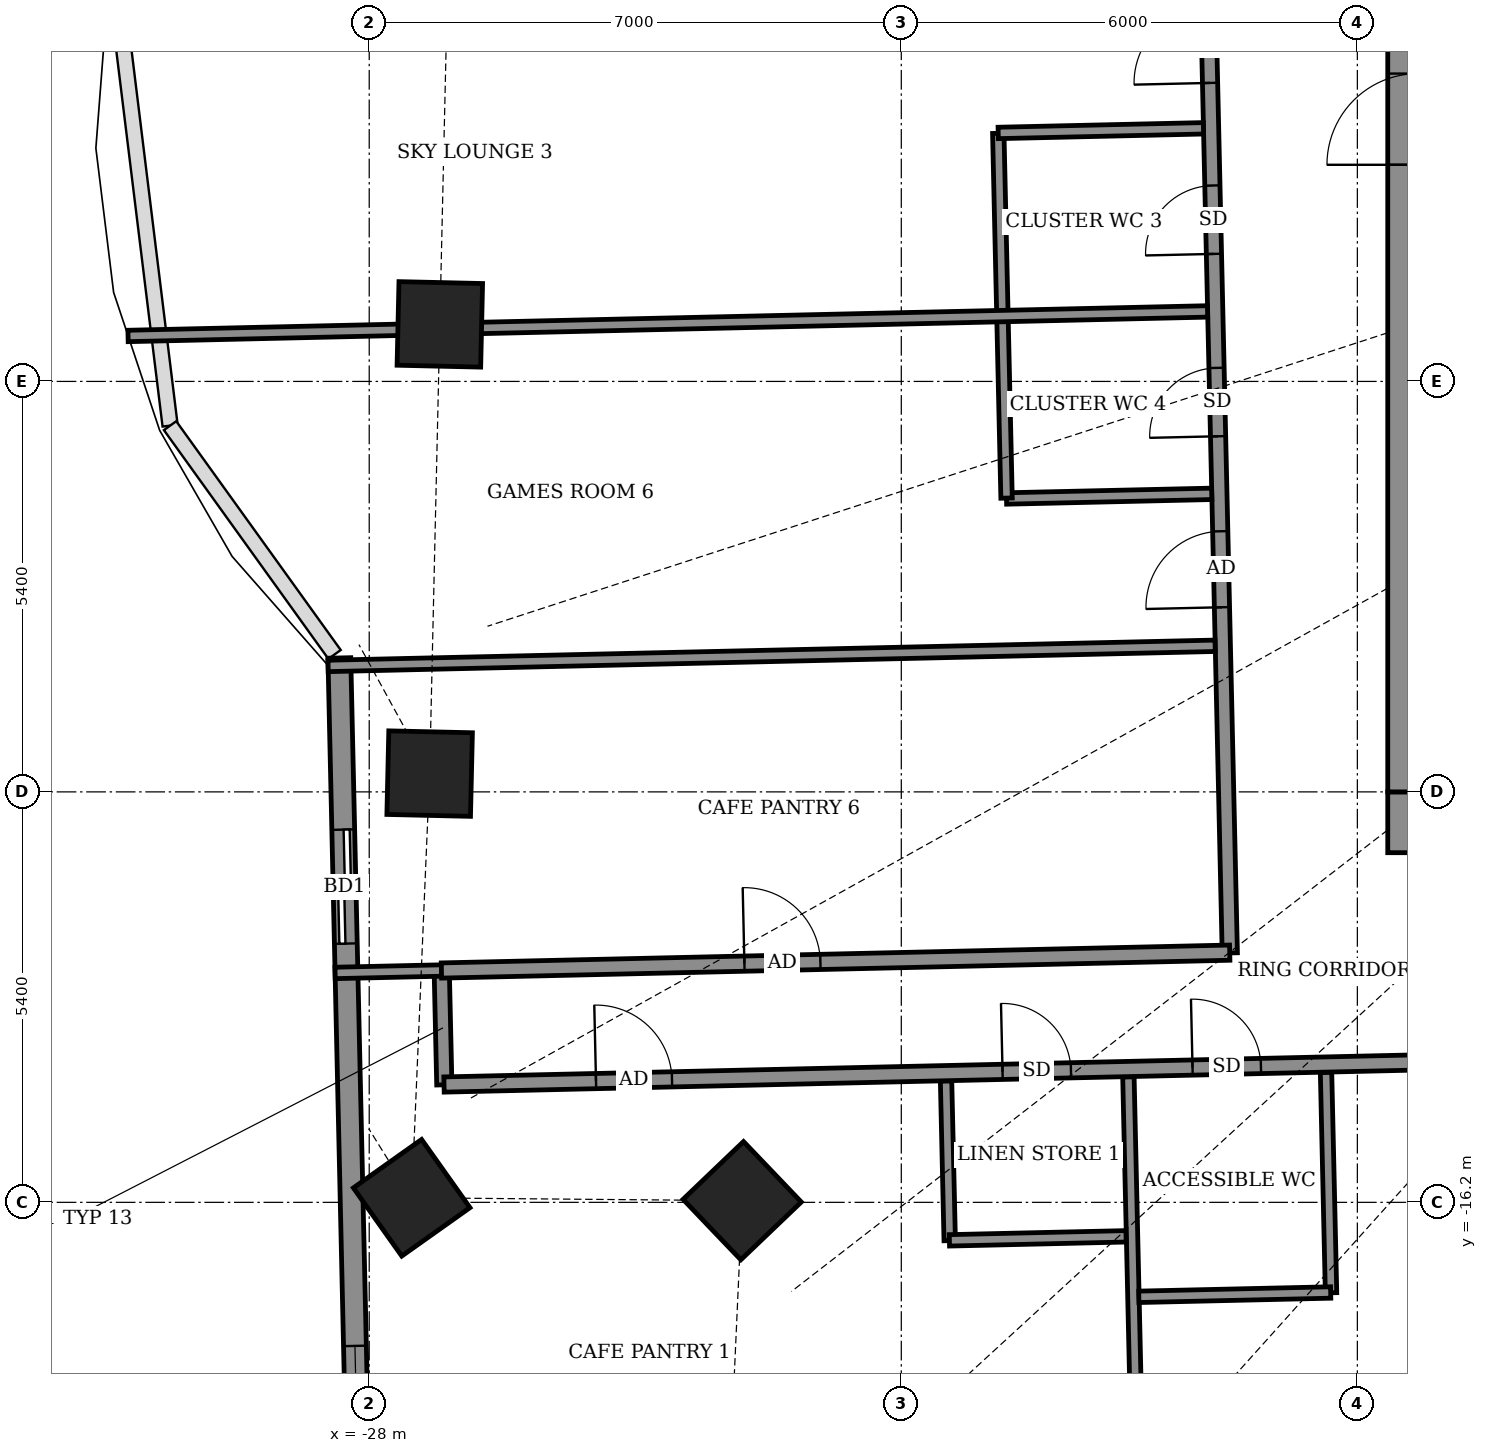
"""IFC4 building model, lengths in metres.
Left out: names, types, materials, properties, quantities, classifications, styles, units other than length and angle.
Written with IfcOpenShell. Run it as: python <this file> out.ifc"""

import sys

from ifc_helpers import new_model, si_unit, direction, frame, frame_2d, origin, origin_2d, place, context, subcontext, project, spatial, rectangle, extrude, element, fill, save


model = new_model("IFC4")
c1 = context("Model", 3, precision=1e-05, world=origin(), true_north=direction((0.0, 1.0)))
c2 = subcontext(c1, "Body", "Model", "MODEL_VIEW")
j1 = project(units=[si_unit("LENGTHUNIT", "METRE"), si_unit("PLANEANGLEUNIT", "RADIAN")], contexts=[c1])
p1 = place(None, origin())
s1 = spatial("IfcSite", under=j1, at=p1, CompositionType="ELEMENT")
p2 = place(p1, origin())
s2 = spatial("IfcBuilding", under=s1, at=p2, CompositionType="ELEMENT")
p3 = place(p2, frame((0.0, 0.0, 226.5)))
s3 = spatial("IfcBuildingStorey", under=s2, at=p3, CompositionType="ELEMENT", Elevation=226.5)
for number, where, z_axis, x_axis in (
    (1, (-27.071, -4.649, -0.55), (0.0, 0.0, 1.0), (-0.023, -1.0, 0.0)),
    (2, (-27.205, -10.56, -0.55), (0.0, 0.0, 1.0), (-0.023, -1.0, 0.0)),
    (3, (-27.441, -16.14, -0.55), (0.0, 0.0, 1.0), (0.579, -0.816, 0.0)),
    (4, (-23.093, -16.178, -0.55), (0.0, 0.0, 1.0), (0.691, -0.723, 0.0)),
):
    element("IfcColumn", number, at=place(p3, frame(where, z_axis=z_axis, x_axis=x_axis)), inside=s3, PredefinedType="COLUMN", context=c2, shape_type="SweptSolid", body=[
        extrude(rectangle(XDim=1.1, YDim=1.1, at=origin_2d()), origin(), (0.0, 0.0, 1.0), 4.6),
    ])
p4 = place(p3, frame((-28.393, -9.038, 0.0), z_axis=(0.0, 0.0, 1.0), x_axis=(0.022656635459, -0.999743305489, 0.0)))
e5 = element("IfcWall", 5, at=p4, inside=s3, PredefinedType="SOLIDWALL", context=c2, shape_type="SweptSolid", body=[
    extrude(rectangle(XDim=12.672, YDim=0.3, at=frame_2d((6.336, 0.0))), origin(), (0.0, 0.0, 1.0), 2.85),
])
p5 = place(p4, frame((2.259, 0.0, 0.0)))
e6 = element("IfcOpeningElement", 6, at=p5, cuts=e5, PredefinedType="OPENING", context=c2, shape_type="SweptSolid", body=[
    extrude(rectangle(XDim=1.5, YDim=2.4, at=frame_2d((0.75, 1.2))), frame((0.0, 0.16, 0.0), z_axis=(0.0, -1.0, 0.0), x_axis=(1.0, 0.0, 0.0)), (0.0, 0.0, 1.0), 0.32),
])
p6 = place(p4, frame((9.053, 0.0, 0.9)))
e7 = element("IfcOpeningElement", 7, at=p6, cuts=e5, PredefinedType="OPENING", context=c2, shape_type="SweptSolid", body=[
    extrude(rectangle(XDim=2.4, YDim=1.5, at=frame_2d((1.2, 0.75))), frame((0.0, 0.16, 0.0), z_axis=(0.0, -1.0, 0.0), x_axis=(1.0, 0.0, 0.0)), (0.0, 0.0, 1.0), 0.32),
])
p7 = place(p3, frame((-17.753, -25.923, 0.0), z_axis=(0.0, 0.0, 1.0), x_axis=(-0.022770155219, 0.999740726404, 0.0)))
e8 = element("IfcWall", 8, at=p7, inside=s3, PredefinedType="PARTITIONING", context=c2, shape_type="SweptSolid", body=[
    extrude(rectangle(XDim=11.376, YDim=0.15, at=frame_2d((5.688, 0.0))), origin(), (0.0, 0.0, 1.0), 2.55),
])
p8 = place(p3, frame((-15.346, -17.39, 0.0), z_axis=(0.0, 0.0, 1.0), x_axis=(-0.022817032779, 0.999739657619, 0.0)))
e9 = element("IfcWall", 9, at=p8, inside=s3, PredefinedType="PARTITIONING", context=c2, shape_type="SweptSolid", body=[
    extrude(rectangle(XDim=2.9, YDim=0.15, at=frame_2d((1.45, 0.0))), origin(), (0.0, 0.0, 1.0), 2.75),
])
p9 = place(p3, frame((-17.875, -17.443, 0.0), z_axis=(0.0, 0.0, 1.0), x_axis=(0.99974392816, 0.022629142889, 0.0)))
e10 = element("IfcWall", 10, at=p9, inside=s3, PredefinedType="PARTITIONING", context=c2, shape_type="SweptSolid", body=[
    extrude(rectangle(XDim=2.525, YDim=0.15, at=frame_2d((1.262, 0.0))), origin(), (0.0, 0.0, 1.0), 2.85),
])
p10 = place(p3, frame((-20.363, -16.704, 0.0), z_axis=(0.0, 0.0, 1.0), x_axis=(-0.022779486249, 0.999740513837, 0.0)))
e11 = element("IfcWall", 11, at=p10, inside=s3, PredefinedType="PARTITIONING", context=c2, shape_type="SweptSolid", body=[
    extrude(rectangle(XDim=2.101, YDim=0.15, at=frame_2d((1.05, 0.0))), origin(), (0.0, 0.0, 1.0), 2.85),
])
p11 = place(p3, frame((-20.367, -16.7, 0.0), z_axis=(0.0, 0.0, 1.0), x_axis=(0.999740260747, 0.02279059109, 0.0)))
e12 = element("IfcWall", 12, at=p11, inside=s3, PredefinedType="PARTITIONING", context=c2, shape_type="SweptSolid", body=[
    extrude(rectangle(XDim=2.324, YDim=0.15, at=frame_2d((1.162, 0.0))), origin(), (0.0, 0.0, 1.0), 2.75),
])
p12 = place(p3, frame((-27.012, -14.654, 0.0), z_axis=(0.0, 0.0, 1.0), x_axis=(-0.022617910375, 0.999744182344, 0.0)))
e13 = element("IfcWall", 13, at=p12, inside=s3, PredefinedType="PARTITIONING", context=c2, shape_type="SweptSolid", body=[
    extrude(rectangle(XDim=1.5, YDim=0.2, at=frame_2d((0.75, 0.0))), origin(), (0.0, 0.0, 1.0), 2.55),
])
p13 = place(p3, frame((-27.016, -14.65, 0.0), z_axis=(0.0, 0.0, 1.0), x_axis=(0.999742722722, 0.022682335961, 0.0)))
e14 = element("IfcWall", 14, at=p13, inside=s3, PredefinedType="PARTITIONING", context=c2, shape_type="SweptSolid", body=[
    extrude(rectangle(XDim=49.114, YDim=0.2, at=frame_2d((24.557, 0.0))), origin(), (0.0, 0.0, 1.0), 2.55),
])
p14 = place(p13, frame((2.0, 0.0, 0.0)))
e15 = element("IfcOpeningElement", 15, at=p14, cuts=e14, PredefinedType="OPENING", context=c2, shape_type="SweptSolid", body=[
    extrude(rectangle(XDim=1.0, YDim=2.1, at=frame_2d((0.5, 1.05))), frame((0.0, 0.11, 0.0), z_axis=(0.0, -1.0, 0.0), x_axis=(1.0, 0.0, 0.0)), (0.0, 0.0, 1.0), 0.22),
])
p15 = place(p13, frame((7.35, 0.0, 0.0)))
e16 = element("IfcOpeningElement", 16, at=p15, cuts=e14, PredefinedType="OPENING", context=c2, shape_type="SweptSolid", body=[
    extrude(rectangle(XDim=0.9, YDim=2.1, at=frame_2d((0.45, 1.05))), frame((0.0, 0.11, 0.0), z_axis=(0.0, -1.0, 0.0), x_axis=(1.0, 0.0, 0.0)), (0.0, 0.0, 1.0), 0.22),
])
p16 = place(p13, frame((13.725, 0.0, 0.0)))
e17 = element("IfcOpeningElement", 17, at=p16, cuts=e14, PredefinedType="OPENING", context=c2, shape_type="SweptSolid", body=[
    extrude(rectangle(XDim=1.0, YDim=2.1, at=frame_2d((0.5, 1.05))), frame((0.0, 0.11, 0.0), z_axis=(0.0, -1.0, 0.0), x_axis=(1.0, 0.0, 0.0)), (0.0, 0.0, 1.0), 0.22),
])
p17 = place(p13, frame((9.85, 0.0, 0.0)))
e18 = element("IfcOpeningElement", 18, at=p17, cuts=e14, PredefinedType="OPENING", context=c2, shape_type="SweptSolid", body=[
    extrude(rectangle(XDim=0.9, YDim=2.1, at=frame_2d((0.45, 1.05))), frame((0.0, 0.11, 0.0), z_axis=(0.0, -1.0, 0.0), x_axis=(1.0, 0.0, 0.0)), (0.0, 0.0, 1.0), 0.22),
])
p18 = place(p13, frame((17.65, 0.0, 0.0)))
e19 = element("IfcOpeningElement", 19, at=p18, cuts=e14, PredefinedType="OPENING", context=c2, shape_type="SweptSolid", body=[
    extrude(rectangle(XDim=0.9, YDim=2.1, at=frame_2d((0.45, 1.05))), frame((0.0, 0.11, 0.0), z_axis=(0.0, -1.0, 0.0), x_axis=(1.0, 0.0, 0.0)), (0.0, 0.0, 1.0), 0.22),
])
p19 = place(p13, frame((24.95, 0.0, 0.0)))
e20 = element("IfcOpeningElement", 20, at=p19, cuts=e14, PredefinedType="OPENING", context=c2, shape_type="SweptSolid", body=[
    extrude(rectangle(XDim=0.9, YDim=2.1, at=frame_2d((0.45, 1.05))), frame((0.0, 0.11, 0.0), z_axis=(0.0, -1.0, 0.0), x_axis=(1.0, 0.0, 0.0)), (0.0, 0.0, 1.0), 0.22),
])
p20 = place(p13, frame((27.425, 0.0, 0.0)))
e21 = element("IfcOpeningElement", 21, at=p20, cuts=e14, PredefinedType="OPENING", context=c2, shape_type="SweptSolid", body=[
    extrude(rectangle(XDim=0.9, YDim=2.1, at=frame_2d((0.45, 1.05))), frame((0.0, 0.11, 0.0), z_axis=(0.0, -1.0, 0.0), x_axis=(1.0, 0.0, 0.0)), (0.0, 0.0, 1.0), 0.22),
])
p21 = place(p13, frame((35.75, 0.0, 0.0)))
e22 = element("IfcOpeningElement", 22, at=p21, cuts=e14, PredefinedType="OPENING", context=c2, shape_type="SweptSolid", body=[
    extrude(rectangle(XDim=1.0, YDim=2.1, at=frame_2d((0.5, 1.05))), frame((0.0, 0.11, 0.0), z_axis=(0.0, -1.0, 0.0), x_axis=(1.0, 0.0, 0.0)), (0.0, 0.0, 1.0), 0.22),
])
p22 = place(p13, frame((32.25, 0.0, 0.0)))
e23 = element("IfcOpeningElement", 23, at=p22, cuts=e14, PredefinedType="OPENING", context=c2, shape_type="SweptSolid", body=[
    extrude(rectangle(XDim=0.9, YDim=2.1, at=frame_2d((0.45, 1.05))), frame((0.0, 0.11, 0.0), z_axis=(0.0, -1.0, 0.0), x_axis=(1.0, 0.0, 0.0)), (0.0, 0.0, 1.0), 0.22),
])
p23 = place(p13, frame((40.925, 0.0, 0.0)))
e24 = element("IfcOpeningElement", 24, at=p23, cuts=e14, PredefinedType="OPENING", context=c2, shape_type="SweptSolid", body=[
    extrude(rectangle(XDim=1.0, YDim=2.1, at=frame_2d((0.5, 1.05))), frame((0.0, 0.11, 0.0), z_axis=(0.0, -1.0, 0.0), x_axis=(1.0, 0.0, 0.0)), (0.0, 0.0, 1.0), 0.22),
])
p24 = place(p13, frame((47.607, 0.0, 0.0)))
e25 = element("IfcOpeningElement", 25, at=p24, cuts=e14, PredefinedType="OPENING", context=c2, shape_type="SweptSolid", body=[
    extrude(rectangle(XDim=1.0, YDim=2.1, at=frame_2d((0.5, 1.05))), frame((0.0, 0.11, 0.0), z_axis=(0.0, -1.0, 0.0), x_axis=(1.0, 0.0, 0.0)), (0.0, 0.0, 1.0), 0.22),
])
p25 = place(p3, frame((-16.678, -12.919, 0.0), z_axis=(0.0, 0.0, 1.0), x_axis=(-0.022696191528, 0.999742408268, 0.0)))
e26 = element("IfcWall", 26, at=p25, inside=s3, PredefinedType="PARTITIONING", context=c2, shape_type="SweptSolid", body=[
    extrude(rectangle(XDim=25.074, YDim=0.2, at=frame_2d((12.537, 0.0))), origin(), (0.0, 0.0, 1.0), 2.65),
])
p26 = place(p25, frame((19.737, 0.0, 0.0)))
e27 = element("IfcOpeningElement", 27, at=p26, cuts=e26, PredefinedType="OPENING", context=c2, shape_type="SweptSolid", body=[
    extrude(rectangle(XDim=1.0, YDim=2.1, at=frame_2d((0.5, 1.05))), frame((0.0, 0.11, 0.0), z_axis=(0.0, -1.0, 0.0), x_axis=(1.0, 0.0, 0.0)), (0.0, 0.0, 1.0), 0.22),
])
p27 = place(p25, frame((23.424, 0.0, 0.0)))
e28 = element("IfcOpeningElement", 28, at=p27, cuts=e26, PredefinedType="OPENING", context=c2, shape_type="SweptSolid", body=[
    extrude(rectangle(XDim=0.9, YDim=2.1, at=frame_2d((0.45, 1.05))), frame((0.0, 0.11, 0.0), z_axis=(0.0, -1.0, 0.0), x_axis=(1.0, 0.0, 0.0)), (0.0, 0.0, 1.0), 0.22),
])
p28 = place(p25, frame((13.624, 0.0, 0.0)))
e29 = element("IfcOpeningElement", 29, at=p28, cuts=e26, PredefinedType="OPENING", context=c2, shape_type="SweptSolid", body=[
    extrude(rectangle(XDim=1.0, YDim=2.1, at=frame_2d((0.5, 1.05))), frame((0.0, 0.11, 0.0), z_axis=(0.0, -1.0, 0.0), x_axis=(1.0, 0.0, 0.0)), (0.0, 0.0, 1.0), 0.22),
])
p29 = place(p25, frame((16.049, 0.0, 0.0)))
e30 = element("IfcOpeningElement", 30, at=p29, cuts=e26, PredefinedType="OPENING", context=c2, shape_type="SweptSolid", body=[
    extrude(rectangle(XDim=0.9, YDim=2.1, at=frame_2d((0.45, 1.05))), frame((0.0, 0.11, 0.0), z_axis=(0.0, -1.0, 0.0), x_axis=(1.0, 0.0, 0.0)), (0.0, 0.0, 1.0), 0.22),
])
p30 = place(p25, frame((11.449, 0.0, 0.0)))
e31 = element("IfcOpeningElement", 31, at=p30, cuts=e26, PredefinedType="OPENING", context=c2, shape_type="SweptSolid", body=[
    extrude(rectangle(XDim=1.0, YDim=2.1, at=frame_2d((0.5, 1.05))), frame((0.0, 0.11, 0.0), z_axis=(0.0, -1.0, 0.0), x_axis=(1.0, 0.0, 0.0)), (0.0, 0.0, 1.0), 0.22),
])
p31 = place(p25, frame((9.199, 0.0, 0.0)))
e32 = element("IfcOpeningElement", 32, at=p31, cuts=e26, PredefinedType="OPENING", context=c2, shape_type="SweptSolid", body=[
    extrude(rectangle(XDim=0.9, YDim=2.1, at=frame_2d((0.45, 1.05))), frame((0.0, 0.11, 0.0), z_axis=(0.0, -1.0, 0.0), x_axis=(1.0, 0.0, 0.0)), (0.0, 0.0, 1.0), 0.22),
])
p32 = place(p25, frame((4.549, 0.0, 0.0)))
e33 = element("IfcOpeningElement", 33, at=p32, cuts=e26, PredefinedType="OPENING", context=c2, shape_type="SweptSolid", body=[
    extrude(rectangle(XDim=1.0, YDim=2.1, at=frame_2d((0.5, 1.05))), frame((0.0, 0.11, 0.0), z_axis=(0.0, -1.0, 0.0), x_axis=(1.0, 0.0, 0.0)), (0.0, 0.0, 1.0), 0.22),
])
p33 = place(p25, frame((6.799, 0.0, 0.0)))
e34 = element("IfcOpeningElement", 34, at=p33, cuts=e26, PredefinedType="OPENING", context=c2, shape_type="SweptSolid", body=[
    extrude(rectangle(XDim=0.9, YDim=2.1, at=frame_2d((0.45, 1.05))), frame((0.0, 0.11, 0.0), z_axis=(0.0, -1.0, 0.0), x_axis=(1.0, 0.0, 0.0)), (0.0, 0.0, 1.0), 0.22),
])
p34 = place(p3, frame((-28.449, -13.182, 0.0), z_axis=(0.0, 0.0, 1.0), x_axis=(0.999740306547, 0.022788581896, 0.0)))
e35 = element("IfcWall", 35, at=p34, inside=s3, PredefinedType="PARTITIONING", context=c2, shape_type="SweptSolid", body=[
    extrude(rectangle(XDim=1.403, YDim=0.15, at=frame_2d((0.702, 0.0))), origin(), (0.0, 0.0, 1.0), 2.55),
])
p35 = place(p3, frame((-27.05, -13.15, 0.0), z_axis=(0.0, 0.0, 1.0), x_axis=(0.999743679035, 0.022640146404, 0.0)))
e36 = element("IfcWall", 36, at=p35, inside=s3, PredefinedType="PARTITIONING", context=c2, shape_type="SweptSolid", body=[
    extrude(rectangle(XDim=10.374, YDim=0.2, at=frame_2d((5.187, 0.0))), origin(), (0.0, 0.0, 1.0), 2.55),
])
p36 = place(p35, frame((3.987, 0.0, 0.0)))
e37 = element("IfcOpeningElement", 37, at=p36, cuts=e36, PredefinedType="OPENING", context=c2, shape_type="SweptSolid", body=[
    extrude(rectangle(XDim=1.0, YDim=2.1, at=frame_2d((0.5, 1.05))), frame((0.0, 0.11, 0.0), z_axis=(0.0, -1.0, 0.0), x_axis=(1.0, 0.0, 0.0)), (0.0, 0.0, 1.0), 0.22),
])
p37 = place(p3, frame((-28.541, -9.143, 0.0), z_axis=(0.0, 0.0, 1.0), x_axis=(0.999742008279, 0.022713803786, 0.0)))
e38 = element("IfcWall", 38, at=p37, inside=s3, PredefinedType="PARTITIONING", context=c2, shape_type="SweptSolid", body=[
    extrude(rectangle(XDim=11.673, YDim=0.15, at=frame_2d((5.836, 0.0))), origin(), (0.0, 0.0, 1.0), 2.55),
])
p38 = place(p3, frame((-19.616, -6.94, 0.0), z_axis=(0.0, 0.0, 1.0), x_axis=(0.99974458177, 0.022600248254, 0.0)))
e39 = element("IfcWall", 39, at=p38, inside=s3, PredefinedType="PARTITIONING", context=c2, shape_type="SweptSolid", body=[
    extrude(rectangle(XDim=2.701, YDim=0.15, at=frame_2d((1.35, 0.0))), origin(), (0.0, 0.0, 1.0), 2.75),
])
p39 = place(p3, frame((-19.615, -6.935, 0.0), z_axis=(0.0, 0.0, 1.0), x_axis=(-0.022734113616, 0.99974154664, 0.0)))
e40 = element("IfcWall", 40, at=p39, inside=s3, PredefinedType="PARTITIONING", context=c2, shape_type="SweptSolid", body=[
    extrude(rectangle(XDim=4.8, YDim=0.15, at=frame_2d((2.4, 0.0))), origin(), (0.0, 0.0, 1.0), 2.75),
])
p40 = place(p3, frame((-31.173, -4.802, 0.0), z_axis=(0.0, 0.0, 1.0), x_axis=(0.999741480525, 0.022737020882, 0.0)))
e41 = element("IfcWall", 41, at=p40, inside=s3, PredefinedType="PARTITIONING", context=c2, shape_type="SweptSolid", body=[
    extrude(rectangle(XDim=14.206, YDim=0.15, at=frame_2d((7.103, 0.0))), origin(), (0.0, 0.0, 1.0), 0.93),
])
p41 = place(p3, frame((-19.725, -2.131, 0.0), z_axis=(0.0, 0.0, 1.0), x_axis=(0.999744627938, 0.022598205876, 0.0)))
e42 = element("IfcWall", 42, at=p41, inside=s3, PredefinedType="PARTITIONING", context=c2, shape_type="SweptSolid", body=[
    extrude(rectangle(XDim=2.701, YDim=0.15, at=frame_2d((1.351, 0.0))), origin(), (0.0, 0.0, 1.0), 4.05),
])
p42 = place(p3, frame((-14.6, -11.2, 0.0), z_axis=(0.0, 0.0, 1.0), x_axis=(1.0, 0.0, 0.0)))
e43 = element("IfcWall", 43, at=p42, inside=s3, PredefinedType="SHEAR", context=c2, shape_type="SweptSolid", body=[
    extrude(rectangle(XDim=29.2, YDim=0.8, at=frame_2d((14.6, 0.0))), origin(), (0.0, 0.0, 1.0), 4.6),
])
p43 = place(p3, frame((-14.2, -10.8, 0.0), z_axis=(0.0, 0.0, 1.0), x_axis=(0.0, 1.0, 0.0)))
e44 = element("IfcWall", 44, at=p43, inside=s3, PredefinedType="SHEAR", context=c2, shape_type="SweptSolid", body=[
    extrude(rectangle(XDim=21.6, YDim=0.8, at=frame_2d((10.8, 0.0))), origin(), (0.0, 0.0, 1.0), 4.6),
])
p44 = place(p43, frame((8.25, 0.0, 0.0)))
e45 = element("IfcOpeningElement", 45, at=p44, cuts=e44, PredefinedType="OPENING", context=c2, shape_type="SweptSolid", body=[
    extrude(rectangle(XDim=1.2, YDim=2.1, at=frame_2d((0.6, 1.05))), frame((0.0, 0.41, 0.0), z_axis=(0.0, -1.0, 0.0), x_axis=(1.0, 0.0, 0.0)), (0.0, 0.0, 1.0), 0.82),
])
p45 = place(p43, frame((15.25, 0.0, 0.0)))
e46 = element("IfcOpeningElement", 46, at=p45, cuts=e44, PredefinedType="OPENING", context=c2, shape_type="SweptSolid", body=[
    extrude(rectangle(XDim=1.2, YDim=2.1, at=frame_2d((0.6, 1.05))), frame((0.0, 0.41, 0.0), z_axis=(0.0, -1.0, 0.0), x_axis=(1.0, 0.0, 0.0)), (0.0, 0.0, 1.0), 0.82),
])
p46 = place(p5, origin())
e47 = element("IfcDoor", 47, at=p46, inside=s3, OperationType="SLIDING_TO_LEFT", PredefinedType="DOOR", context=c2, shape_type="SweptSolid", body=[
    extrude(rectangle(XDim=1.5, YDim=2.4, at=frame_2d((0.75, 1.2))), frame((0.0, 0.025, 0.0), z_axis=(0.0, -1.0, 0.0), x_axis=(1.0, 0.0, 0.0)), (0.0, 0.0, 1.0), 0.05),
])
fill(e6, e47)
p47 = place(p6, origin())
e48 = element("IfcWindow", 48, at=p47, inside=s3, PartitioningType="DOUBLE_PANEL_VERTICAL", PredefinedType="WINDOW", context=c2, shape_type="SweptSolid", body=[
    extrude(rectangle(XDim=2.4, YDim=1.5, at=frame_2d((1.2, 0.75))), frame((0.0, 0.03, 0.0), z_axis=(0.0, -1.0, 0.0), x_axis=(1.0, 0.0, 0.0)), (0.0, 0.0, 1.0), 0.06),
])
fill(e7, e48)
p48 = place(p14, origin())
e49 = element("IfcDoor", 49, at=p48, inside=s3, OperationType="SINGLE_SWING_LEFT", PredefinedType="DOOR", context=c2, shape_type="SweptSolid", body=[
    extrude(rectangle(XDim=1.0, YDim=2.1, at=frame_2d((0.5, 1.05))), frame((0.0, 0.025, 0.0), z_axis=(0.0, -1.0, 0.0), x_axis=(1.0, 0.0, 0.0)), (0.0, 0.0, 1.0), 0.05),
])
fill(e15, e49)
p49 = place(p15, origin())
e50 = element("IfcDoor", 50, at=p49, inside=s3, OperationType="SINGLE_SWING_LEFT", PredefinedType="DOOR", context=c2, shape_type="SweptSolid", body=[
    extrude(rectangle(XDim=0.9, YDim=2.1, at=frame_2d((0.45, 1.05))), frame((0.0, 0.025, 0.0), z_axis=(0.0, -1.0, 0.0), x_axis=(1.0, 0.0, 0.0)), (0.0, 0.0, 1.0), 0.05),
])
fill(e16, e50)
p50 = place(p17, origin())
e51 = element("IfcDoor", 51, at=p50, inside=s3, OperationType="SINGLE_SWING_RIGHT", PredefinedType="DOOR", context=c2, shape_type="SweptSolid", body=[
    extrude(rectangle(XDim=0.9, YDim=2.1, at=frame_2d((0.45, 1.05))), frame((0.0, 0.025, 0.0), z_axis=(0.0, -1.0, 0.0), x_axis=(1.0, 0.0, 0.0)), (0.0, 0.0, 1.0), 0.05),
])
fill(e18, e51)
p51 = place(p30, origin())
e52 = element("IfcDoor", 52, at=p51, inside=s3, OperationType="SINGLE_SWING_RIGHT", PredefinedType="DOOR", context=c2, shape_type="SweptSolid", body=[
    extrude(rectangle(XDim=1.0, YDim=2.1, at=frame_2d((0.5, 1.05))), frame((0.0, 0.025, 0.0), z_axis=(0.0, -1.0, 0.0), x_axis=(1.0, 0.0, 0.0)), (0.0, 0.0, 1.0), 0.05),
])
fill(e31, e52)
p52 = place(p31, origin())
e53 = element("IfcDoor", 53, at=p52, inside=s3, OperationType="SINGLE_SWING_RIGHT", PredefinedType="DOOR", context=c2, shape_type="SweptSolid", body=[
    extrude(rectangle(XDim=0.9, YDim=2.1, at=frame_2d((0.45, 1.05))), frame((0.0, 0.025, 0.0), z_axis=(0.0, -1.0, 0.0), x_axis=(1.0, 0.0, 0.0)), (0.0, 0.0, 1.0), 0.05),
])
fill(e32, e53)
p53 = place(p32, origin())
e54 = element("IfcDoor", 54, at=p53, inside=s3, OperationType="SINGLE_SWING_LEFT", PredefinedType="DOOR", context=c2, shape_type="SweptSolid", body=[
    extrude(rectangle(XDim=1.0, YDim=2.1, at=frame_2d((0.5, 1.05))), frame((0.0, 0.025, 0.0), z_axis=(0.0, -1.0, 0.0), x_axis=(1.0, 0.0, 0.0)), (0.0, 0.0, 1.0), 0.05),
])
fill(e33, e54)
p54 = place(p33, origin())
e55 = element("IfcDoor", 55, at=p54, inside=s3, OperationType="SINGLE_SWING_LEFT", PredefinedType="DOOR", context=c2, shape_type="SweptSolid", body=[
    extrude(rectangle(XDim=0.9, YDim=2.1, at=frame_2d((0.45, 1.05))), frame((0.0, 0.025, 0.0), z_axis=(0.0, -1.0, 0.0), x_axis=(1.0, 0.0, 0.0)), (0.0, 0.0, 1.0), 0.05),
])
fill(e34, e55)
p55 = place(p36, origin())
e56 = element("IfcDoor", 56, at=p55, inside=s3, OperationType="SINGLE_SWING_RIGHT", PredefinedType="DOOR", context=c2, shape_type="SweptSolid", body=[
    extrude(rectangle(XDim=1.0, YDim=2.1, at=frame_2d((0.5, 1.05))), frame((0.0, 0.025, 0.0), z_axis=(0.0, -1.0, 0.0), x_axis=(1.0, 0.0, 0.0)), (0.0, 0.0, 1.0), 0.05),
])
fill(e37, e56)
save(model, sys.argv[1])
